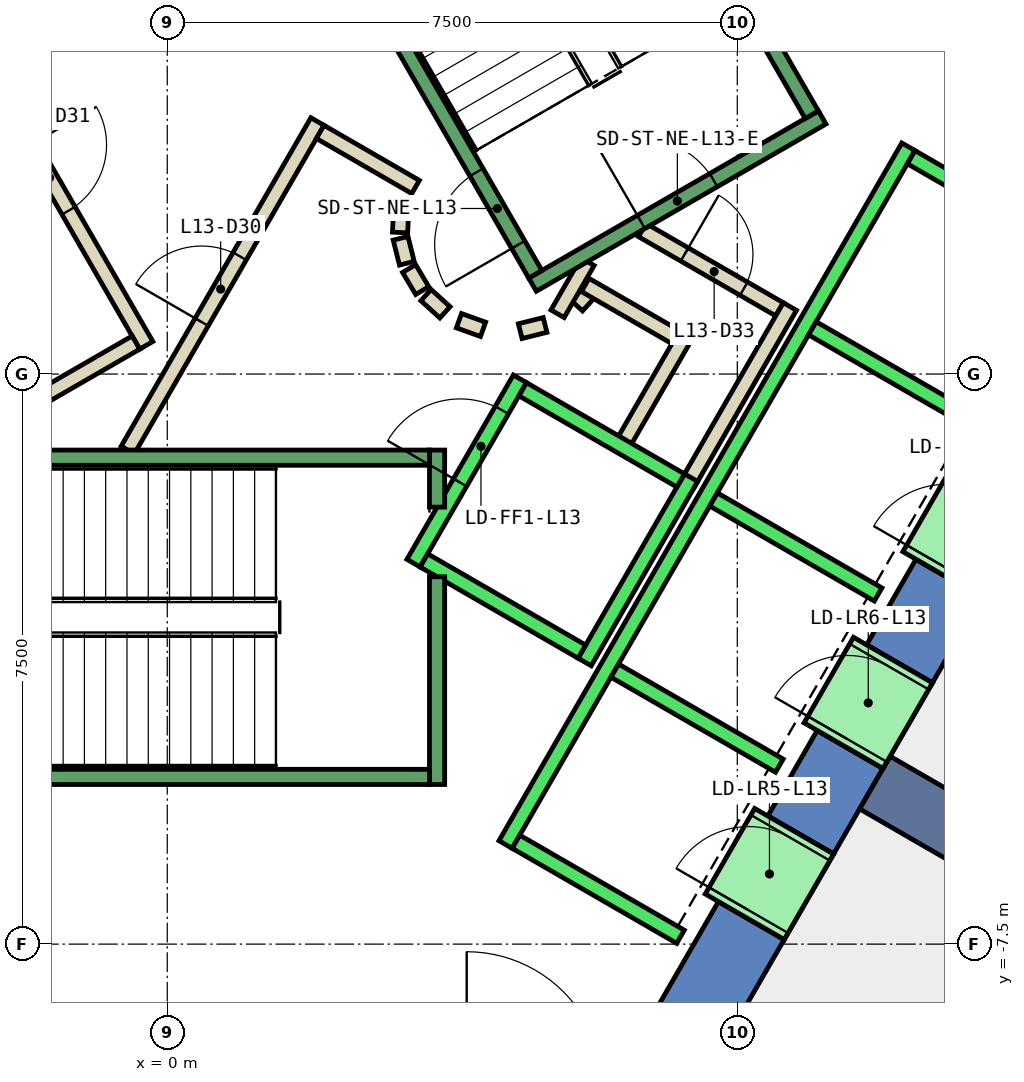
"""IFC4 building model, lengths in metres.
Left out: names, types, materials, properties, quantities, classifications, styles, units other than length and angle.
Written with IfcOpenShell. Run it as: python <this file> out.ifc"""

import sys

from ifc_helpers import new_model, si_unit, direction, frame, frame_2d, origin, place, context, subcontext, project, spatial, polyline, rectangle, outline, extrude, element, fill, save


model = new_model("IFC4")
c1 = context("Model", 3, precision=1e-05, world=origin(), true_north=direction((0.0, 1.0)))
c2 = subcontext(c1, "Body", "Model", "MODEL_VIEW")
j1 = project(units=[si_unit("LENGTHUNIT", "METRE"), si_unit("PLANEANGLEUNIT", "RADIAN")], contexts=[c1])
p1 = place(None, origin())
s1 = spatial("IfcSite", under=j1, at=p1, CompositionType="ELEMENT")
p2 = place(p1, origin())
s2 = spatial("IfcBuilding", under=s1, at=p2, CompositionType="ELEMENT")
p3 = place(p2, frame((0.0, 0.0, 64.4)))
s3 = spatial("IfcBuildingStorey", under=s2, at=p3, CompositionType="ELEMENT", Elevation=64.4)
p4 = place(p3, frame((0.0, 0.0, -0.4)))
e1 = element("IfcWall", 1, at=p4, inside=s3, PredefinedType="SHEAR", context=c2, shape_type="SweptSolid", body=[
    extrude(outline(polyline([(8.517, 11.748), (7.651, 11.248), (12.702, 2.5), (13.856, 2.5), (8.517, 11.748)])), origin(), (0.0, 0.0, 1.0), 4.2),
])
p5 = place(p3, frame((0.0, 0.0, -0.4)))
e2 = element("IfcWall", 2, at=p5, inside=s3, PredefinedType="SHEAR", context=c2, shape_type="SweptSolid", body=[
    extrude(outline(polyline([(8.117, -7.44), (7.252, -6.94), (6.351, -8.5), (6.928, -9.5), (8.117, -7.44)])), origin(), (0.0, 0.0, 1.0), 4.2),
])
p6 = place(p3, frame((0.0, 0.0, -0.4)))
e3 = element("IfcWall", 3, at=p6, inside=s3, PredefinedType="SHEAR", context=c2, shape_type="SweptSolid", body=[
    extrude(outline(polyline([(9.417, -5.189), (8.551, -4.689), (7.902, -5.814), (8.767, -6.314), (9.417, -5.189)])), origin(), (0.0, 0.0, 1.0), 4.2),
])
p7 = place(p3, frame((0.0, 0.0, -0.4)))
e4 = element("IfcWall", 4, at=p7, inside=s3, PredefinedType="SHEAR", context=c2, shape_type="SweptSolid", body=[
    extrude(outline(polyline([(10.717, -2.937), (9.851, -2.437), (9.201, -3.563), (10.067, -4.063), (10.717, -2.937)])), origin(), (0.0, 0.0, 1.0), 4.2),
])
p8 = place(p3, frame((0.0, 0.0, 3.6)))
e5 = element("IfcWall", 5, at=p8, inside=s3, PredefinedType="SHEAR", context=c2, shape_type="SweptSolid", body=[
    extrude(outline(polyline([(8.767, -6.314), (7.902, -5.814), (7.252, -6.94), (8.117, -7.44), (8.767, -6.314)])), origin(), (0.0, 0.0, 1.0), 0.2),
])
p9 = place(p3, frame((0.0, 0.0, 3.6)))
e6 = element("IfcWall", 6, at=p9, inside=s3, PredefinedType="SHEAR", context=c2, shape_type="SweptSolid", body=[
    extrude(outline(polyline([(10.067, -4.063), (9.201, -3.563), (8.551, -4.689), (9.417, -5.189), (10.067, -4.063)])), origin(), (0.0, 0.0, 1.0), 0.2),
])
p10 = place(p3, frame((0.0, 0.0, 3.6)))
e7 = element("IfcWall", 7, at=p10, inside=s3, PredefinedType="SHEAR", context=c2, shape_type="SweptSolid", body=[
    extrude(outline(polyline([(11.367, -1.811), (10.501, -1.311), (9.851, -2.437), (10.717, -2.937), (11.367, -1.811)])), origin(), (0.0, 0.0, 1.0), 0.2),
])
p11 = place(p3, frame((9.31, -5.375, -0.4), z_axis=(0.0, 0.0, 1.0), x_axis=(0.866017533419, -0.500013631625, 0.0)))
e8 = element("IfcWall", 8, at=p11, inside=s3, PredefinedType="SHEAR", context=c2, shape_type="SweptSolid", body=[
    extrude(rectangle(XDim=9.0, YDim=0.8, at=frame_2d((4.5, 0.0))), origin(), (0.0, 0.0, 1.0), 4.2),
])
p12 = place(p3, frame((5.39, 0.898, 0.0), z_axis=(0.0, 0.0, 1.0), x_axis=(0.673828488714, 0.738887791073, 0.0)))
e9 = element("IfcWall", 9, at=p12, inside=s3, PredefinedType="PARTITIONING", context=c2, shape_type="SweptSolid", body=[
    extrude(rectangle(XDim=0.263, YDim=0.2, at=frame_2d((0.131, 0.0))), origin(), (0.0, 0.0, 1.0), 3.8),
])
p13 = place(p3, frame((5.499, 1.172, 0.0), z_axis=(0.0, 0.0, 1.0), x_axis=(0.866333505267, -0.499465972466, 0.0)))
e10 = element("IfcWall", 10, at=p13, inside=s3, PredefinedType="PARTITIONING", context=c2, shape_type="SweptSolid", body=[
    extrude(rectangle(XDim=1.374, YDim=0.2, at=frame_2d((0.687, 0.0))), origin(), (0.0, 0.0, 1.0), 3.8),
])
p14 = place(p3, frame((6.826, 0.522, 0.0), z_axis=(0.0, 0.0, 1.0), x_axis=(-0.500016722714, -0.866015748706, 0.0)))
e11 = element("IfcWall", 11, at=p14, inside=s3, PredefinedType="PARTITIONING", context=c2, shape_type="SweptSolid", body=[
    extrude(rectangle(XDim=1.7, YDim=0.2, at=frame_2d((0.85, 0.0))), origin(), (0.0, 0.0, 1.0), 3.8),
])
p15 = place(p3, frame((6.25, 1.894, 0.0), z_axis=(0.0, 0.0, 1.0), x_axis=(0.866043184279, -0.499969202016, 0.0)))
e12 = element("IfcWall", 12, at=p15, inside=s3, PredefinedType="PARTITIONING", context=c2, shape_type="SweptSolid", body=[
    extrude(rectangle(XDim=2.084, YDim=0.2, at=frame_2d((1.042, 0.0))), origin(), (0.0, 0.0, 1.0), 3.8),
])
p16 = place(p15, frame((0.642, 0.0, 0.0)))
e13 = element("IfcOpeningElement", 13, at=p16, cuts=e12, PredefinedType="OPENING", context=c2, shape_type="SweptSolid", body=[
    extrude(rectangle(XDim=0.9, YDim=2.1, at=frame_2d((0.45, 1.05))), frame((0.0, 0.11, 0.0), z_axis=(0.0, -1.0, 0.0), x_axis=(1.0, 0.0, 0.0)), (0.0, 0.0, 1.0), 0.22),
])
p17 = place(p3, frame((8.192, 0.888, 0.0), z_axis=(0.0, 0.0, 1.0), x_axis=(-0.499940625693, -0.866059680843, 0.0)))
e14 = element("IfcWall", 14, at=p17, inside=s3, PredefinedType="PARTITIONING", context=c2, shape_type="SweptSolid", body=[
    extrude(rectangle(XDim=2.68, YDim=0.2, at=frame_2d((1.34, 0.0))), origin(), (0.0, 0.0, 1.0), 3.8),
])
p18 = place(p3, frame((5.135, 0.793, 0.0), z_axis=(0.0, 0.0, 1.0), x_axis=(0.499526442893, 0.866298639529, 0.0)))
e15 = element("IfcWall", 15, at=p18, inside=s3, PredefinedType="PARTITIONING", context=c2, shape_type="SweptSolid", body=[
    extrude(rectangle(XDim=0.791, YDim=0.2, at=frame_2d((0.396, 0.0))), origin(), (0.0, 0.0, 1.0), 3.8),
])
p19 = place(p3, frame((-0.52, -1.0, 0.0), z_axis=(0.0, 0.0, 1.0), x_axis=(0.50011622646, 0.865958290007, 0.0)))
e16 = element("IfcWall", 16, at=p19, inside=s3, PredefinedType="PARTITIONING", context=c2, shape_type="SweptSolid", body=[
    extrude(rectangle(XDim=4.991, YDim=0.2, at=frame_2d((2.496, 0.0))), origin(), (0.0, 0.0, 1.0), 3.8),
])
p20 = place(p19, frame((1.945, 0.0, 0.0)))
e17 = element("IfcOpeningElement", 17, at=p20, cuts=e16, PredefinedType="OPENING", context=c2, shape_type="SweptSolid", body=[
    extrude(rectangle(XDim=1.0, YDim=2.1, at=frame_2d((0.5, 1.05))), frame((0.0, 0.11, 0.0), z_axis=(0.0, -1.0, 0.0), x_axis=(1.0, 0.0, 0.0)), (0.0, 0.0, 1.0), 0.22),
])
p21 = place(p3, frame((2.012, 3.186, 0.0), z_axis=(0.0, 0.0, 1.0), x_axis=(0.865891012941, -0.500232699559, 0.0)))
e18 = element("IfcWall", 18, at=p21, inside=s3, PredefinedType="PARTITIONING", context=c2, shape_type="SweptSolid", body=[
    extrude(rectangle(XDim=1.449, YDim=0.2, at=frame_2d((0.725, 0.0))), origin(), (0.0, 0.0, 1.0), 3.8),
])
p22 = place(p3, frame((3.079, 2.199, 0.0), z_axis=(0.0, 0.0, 1.0), x_axis=(-0.047771483479, -0.998858290933, 0.0)))
e19 = element("IfcWall", 19, at=p22, inside=s3, PredefinedType="PARTITIONING", context=c2, shape_type="SweptSolid", body=[
    extrude(rectangle(XDim=0.337, YDim=0.2, at=frame_2d((0.169, 0.0))), origin(), (0.0, 0.0, 1.0), 3.8),
])
p23 = place(p3, frame((3.07, 1.786, 0.0), z_axis=(0.0, 0.0, 1.0), x_axis=(0.242705583207, -0.970099994784, 0.0)))
e20 = element("IfcWall", 20, at=p23, inside=s3, PredefinedType="PARTITIONING", context=c2, shape_type="SweptSolid", body=[
    extrude(rectangle(XDim=0.338, YDim=0.2, at=frame_2d((0.169, 0.0))), origin(), (0.0, 0.0, 1.0), 3.8),
])
for number, where, z_axis, x_axis in (
    (21, (3.182, 1.388, 0.0), (0.0, 0.0, 1.0), (0.512, -0.859, 0.0)),
    (22, (3.404, 1.039, 0.0), (0.0, 0.0, 1.0), (0.74, -0.672, 0.0)),
):
    element("IfcWall", number, at=place(p3, frame(where, z_axis=z_axis, x_axis=x_axis)), inside=s3, PredefinedType="PARTITIONING", context=c2, shape_type="SweptSolid", body=[
        extrude(rectangle(XDim=0.338, YDim=0.2, at=frame_2d((0.169, 0.0))), origin(), (0.0, 0.0, 1.0), 3.8),
    ])
p24 = place(p3, frame((3.838, 0.702, 0.0), z_axis=(0.0, 0.0, 1.0), x_axis=(0.941035081519, -0.338308993895, 0.0)))
e23 = element("IfcWall", 23, at=p24, inside=s3, PredefinedType="PARTITIONING", context=c2, shape_type="SweptSolid", body=[
    extrude(rectangle(XDim=0.337, YDim=0.2, at=frame_2d((0.168, 0.0))), origin(), (0.0, 0.0, 1.0), 3.8),
])
p25 = place(p3, frame((4.644, 0.564, 0.0), z_axis=(0.0, 0.0, 1.0), x_axis=(0.969929076366, 0.243387729394, 0.0)))
e24 = element("IfcWall", 24, at=p25, inside=s3, PredefinedType="PARTITIONING", context=c2, shape_type="SweptSolid", body=[
    extrude(rectangle(XDim=0.337, YDim=0.2, at=frame_2d((0.168, 0.0))), origin(), (0.0, 0.0, 1.0), 3.8),
])
p26 = place(p3, frame((-2.771, 4.7, 0.0), z_axis=(0.0, 0.0, 1.0), x_axis=(0.499969479948, -0.866043023828, 0.0)))
e25 = element("IfcWall", 25, at=p26, inside=s3, PredefinedType="PARTITIONING", context=c2, shape_type="SweptSolid", body=[
    extrude(rectangle(XDim=4.99, YDim=0.2, at=frame_2d((2.495, 0.0))), origin(), (0.0, 0.0, 1.0), 3.8),
])
p27 = place(p26, frame((1.945, 0.0, 0.0)))
e26 = element("IfcOpeningElement", 26, at=p27, cuts=e25, PredefinedType="OPENING", context=c2, shape_type="SweptSolid", body=[
    extrude(rectangle(XDim=1.0, YDim=2.1, at=frame_2d((0.5, 1.05))), frame((0.0, 0.11, 0.0), z_axis=(0.0, -1.0, 0.0), x_axis=(1.0, 0.0, 0.0)), (0.0, 0.0, 1.0), 0.22),
])
p28 = place(p3, frame((-0.412, 0.414, 0.0), z_axis=(0.0, 0.0, 1.0), x_axis=(-0.866017369001, -0.500013916395, 0.0)))
e27 = element("IfcWall", 27, at=p28, inside=s3, PredefinedType="PARTITIONING", context=c2, shape_type="SweptSolid", body=[
    extrude(rectangle(XDim=1.45, YDim=0.2, at=frame_2d((0.725, 0.0))), origin(), (0.0, 0.0, 1.0), 3.8),
])
p29 = place(p3, frame((12.401, -7.622, 0.0), z_axis=(0.0, 0.0, 1.0), x_axis=(-0.500029185841, -0.866008552675, 0.0)))
e28 = element("IfcWall", 28, at=p29, inside=s3, PredefinedType="PARTITIONING", context=c2, shape_type="SweptSolid", body=[
    extrude(rectangle(XDim=9.301, YDim=0.2, at=frame_2d((4.651, 0.0))), origin(), (0.0, 0.0, 1.0), 3.8),
])
p30 = place(p3, frame((3.24, -2.488, 0.0), z_axis=(0.0, 0.0, 1.0), x_axis=(0.49994636267, 0.866056369097, 0.0)))
e29 = element("IfcWall", 29, at=p30, inside=s3, PredefinedType="STANDARD", context=c2, shape_type="SweptSolid", body=[
    extrude(rectangle(XDim=2.8, YDim=0.2, at=frame_2d((1.4, 0.0))), origin(), (0.0, 0.0, 1.0), 3.8),
])
p31 = place(p30, frame((1.225, 0.0, 0.0)))
e30 = element("IfcOpeningElement", 30, at=p31, cuts=e29, PredefinedType="OPENING", context=c2, shape_type="SweptSolid", body=[
    extrude(rectangle(XDim=1.1, YDim=2.1, at=frame_2d((0.55, 1.05))), frame((0.0, 0.11, 0.0), z_axis=(0.0, -1.0, 0.0), x_axis=(1.0, 0.0, 0.0)), (0.0, 0.0, 1.0), 0.22),
])
p32 = place(p3, frame((5.492, -3.788, 0.0), z_axis=(0.0, 0.0, 1.0), x_axis=(0.500011755427, 0.866018616679, 0.0)))
e31 = element("IfcWall", 31, at=p32, inside=s3, PredefinedType="STANDARD", context=c2, shape_type="SweptSolid", body=[
    extrude(rectangle(XDim=2.8, YDim=0.2, at=frame_2d((1.4, 0.0))), origin(), (0.0, 0.0, 1.0), 3.8),
])
p33 = place(p3, frame((3.377, -2.452, 0.0), z_axis=(0.0, 0.0, 1.0), x_axis=(0.865955154139, -0.50012165622, 0.0)))
e32 = element("IfcWall", 32, at=p33, inside=s3, PredefinedType="STANDARD", context=c2, shape_type="SweptSolid", body=[
    extrude(rectangle(XDim=2.4, YDim=0.2, at=frame_2d((1.2, 0.0))), origin(), (0.0, 0.0, 1.0), 3.8),
])
p34 = place(p3, frame((4.677, -0.2, 0.0), z_axis=(0.0, 0.0, 1.0), x_axis=(0.865973769406, -0.500089422704, 0.0)))
e33 = element("IfcWall", 33, at=p34, inside=s3, PredefinedType="STANDARD", context=c2, shape_type="SweptSolid", body=[
    extrude(rectangle(XDim=2.399, YDim=0.2, at=frame_2d((1.2, 0.0))), origin(), (0.0, 0.0, 1.0), 3.8),
])
p35 = place(p3, frame((4.451, -6.19, 0.0), z_axis=(0.0, 0.0, 1.0), x_axis=(0.50000090737, 0.866024879913, 0.0)))
e34 = element("IfcWall", 34, at=p35, inside=s3, PredefinedType="STANDARD", context=c2, shape_type="SweptSolid", body=[
    extrude(rectangle(XDim=10.6, YDim=0.2, at=frame_2d((5.3, 0.0))), origin(), (0.0, 0.0, 1.0), 3.8),
])
for number, where, z_axis, x_axis in (
    (35, (4.588, -6.153, 0.0), (0.0, 0.0, 1.0), (0.866, -0.5, 0.0)),
    (36, (5.888, -3.902, 0.0), (0.0, 0.0, 1.0), (0.866, -0.5, 0.0)),
    (37, (7.188, -1.65, 0.0), (0.0, 0.0, 1.0), (0.866, -0.5, 0.0)),
    (38, (8.488, 0.602, 0.0), (0.0, 0.0, 1.0), (0.866, -0.5, 0.0)),
):
    element("IfcWall", number, at=place(p3, frame(where, z_axis=z_axis, x_axis=x_axis)), inside=s3, PredefinedType="STANDARD", context=c2, shape_type="SweptSolid", body=[
        extrude(rectangle(XDim=2.5, YDim=0.2, at=frame_2d((1.25, 0.0))), origin(), (0.0, 0.0, 1.0), 3.8),
    ])
p36 = place(p3, frame((9.788, 2.853, 0.0), z_axis=(0.0, 0.0, 1.0), x_axis=(0.865998541277, -0.500046524342, 0.0)))
e39 = element("IfcWall", 39, at=p36, inside=s3, PredefinedType="STANDARD", context=c2, shape_type="SweptSolid", body=[
    extrude(rectangle(XDim=2.5, YDim=0.2, at=frame_2d((1.25, 0.0))), origin(), (0.0, 0.0, 1.0), 3.8),
])
p37 = place(p3, frame((7.598, -7.14, 0.0), z_axis=(0.0, 0.0, 1.0), x_axis=(0.500362116554, 0.865816234728, 0.0)))
e40 = element("IfcWall", 40, at=p37, inside=s3, PredefinedType="STANDARD", context=c2, shape_type="SweptSolid", body=[
    extrude(rectangle(XDim=1.299, YDim=1.2, at=frame_2d((0.65, 0.0))), origin(), (0.0, 0.0, 1.0), 2.4),
])
p38 = place(p37, frame((0.1, 0.0, 0.0)))
e41 = element("IfcOpeningElement", 41, at=p38, cuts=e40, PredefinedType="OPENING", context=c2, shape_type="SweptSolid", body=[
    extrude(rectangle(XDim=1.1, YDim=2.3, at=frame_2d((0.55, 1.15))), frame((0.0, 0.61, 0.0), z_axis=(0.0, -1.0, 0.0), x_axis=(1.0, 0.0, 0.0)), (0.0, 0.0, 1.0), 1.22),
])
p39 = place(p3, frame((8.898, -4.889, 0.0), z_axis=(0.0, 0.0, 1.0), x_axis=(0.500036693733, 0.866004217611, 0.0)))
e42 = element("IfcWall", 42, at=p39, inside=s3, PredefinedType="STANDARD", context=c2, shape_type="SweptSolid", body=[
    extrude(rectangle(XDim=1.3, YDim=1.2, at=frame_2d((0.65, 0.0))), origin(), (0.0, 0.0, 1.0), 2.4),
])
p40 = place(p39, frame((0.1, 0.0, 0.0)))
e43 = element("IfcOpeningElement", 43, at=p40, cuts=e42, PredefinedType="OPENING", context=c2, shape_type="SweptSolid", body=[
    extrude(rectangle(XDim=1.1, YDim=2.3, at=frame_2d((0.55, 1.15))), frame((0.0, 0.61, 0.0), z_axis=(0.0, -1.0, 0.0), x_axis=(1.0, 0.0, 0.0)), (0.0, 0.0, 1.0), 1.22),
])
p41 = place(p3, frame((10.198, -2.637, 0.0), z_axis=(0.0, 0.0, 1.0), x_axis=(0.49989585183, 0.866085525409, 0.0)))
e44 = element("IfcWall", 44, at=p41, inside=s3, PredefinedType="STANDARD", context=c2, shape_type="SweptSolid", body=[
    extrude(rectangle(XDim=1.3, YDim=1.2, at=frame_2d((0.65, 0.0))), origin(), (0.0, 0.0, 1.0), 2.4),
])
p42 = place(p41, frame((0.1, 0.0, 0.0)))
e45 = element("IfcOpeningElement", 45, at=p42, cuts=e44, PredefinedType="OPENING", context=c2, shape_type="SweptSolid", body=[
    extrude(rectangle(XDim=1.1, YDim=2.3, at=frame_2d((0.55, 1.15))), frame((0.0, 0.61, 0.0), z_axis=(0.0, -1.0, 0.0), x_axis=(1.0, 0.0, 0.0)), (0.0, 0.0, 1.0), 1.22),
])
p43 = place(p3, frame((3.55, -2.667, 0.0), z_axis=(0.0, 0.0, 1.0), x_axis=(0.0, -1.0, 0.0)))
e46 = element("IfcWall", 46, at=p43, inside=s3, PredefinedType="STANDARD", context=c2, shape_type="SweptSolid", body=[
    extrude(rectangle(XDim=2.733, YDim=0.2, at=frame_2d((1.366, 0.0))), origin(), (0.0, 0.0, 1.0), 3.8),
])
p44 = place(p3, frame((3.55, -1.0, 0.0), z_axis=(0.0, 0.0, 1.0), x_axis=(0.0, -1.0, 0.0)))
e47 = element("IfcWall", 47, at=p44, inside=s3, PredefinedType="STANDARD", context=c2, shape_type="SweptSolid", body=[
    extrude(rectangle(XDim=0.751, YDim=0.2, at=frame_2d((0.375, 0.0))), origin(), (0.0, 0.0, 1.0), 3.8),
])
p45 = place(p3, frame((-3.45, -1.1, 0.0), z_axis=(0.0, 0.0, 1.0), x_axis=(1.0, 0.0, 0.0)))
e48 = element("IfcWall", 48, at=p45, inside=s3, PredefinedType="STANDARD", context=c2, shape_type="SweptSolid", body=[
    extrude(rectangle(XDim=6.9, YDim=0.2, at=frame_2d((3.45, 0.0))), origin(), (0.0, 0.0, 1.0), 3.8),
])
p46 = place(p45, frame((0.45, 0.0, 0.0)))
e49 = element("IfcOpeningElement", 49, at=p46, cuts=e48, PredefinedType="OPENING", context=c2, shape_type="SweptSolid", body=[
    extrude(rectangle(XDim=1.1, YDim=2.2, at=frame_2d((0.55, 1.1))), frame((0.0, 0.11, 0.0), z_axis=(0.0, -1.0, 0.0), x_axis=(1.0, 0.0, 0.0)), (0.0, 0.0, 1.0), 0.22),
])
p47 = place(p3, frame((-3.45, -5.3, 0.0), z_axis=(0.0, 0.0, 1.0), x_axis=(1.0, 0.0, 0.0)))
e50 = element("IfcWall", 50, at=p47, inside=s3, PredefinedType="STANDARD", context=c2, shape_type="SweptSolid", body=[
    extrude(rectangle(XDim=6.9, YDim=0.2, at=frame_2d((3.45, 0.0))), origin(), (0.0, 0.0, 1.0), 3.8),
])
p48 = place(p3, frame((4.806, 1.176, 0.0), z_axis=(0.0, 0.0, 1.0), x_axis=(0.866059941101, 0.499940174841, 0.0)))
e51 = element("IfcWall", 51, at=p48, inside=s3, PredefinedType="STANDARD", context=c2, shape_type="SweptSolid", body=[
    extrude(rectangle(XDim=4.4, YDim=0.2, at=frame_2d((2.2, 0.0))), origin(), (0.0, 0.0, 1.0), 3.8),
])
p49 = place(p48, frame((1.65, 0.0, 0.0)))
e52 = element("IfcOpeningElement", 52, at=p49, cuts=e51, PredefinedType="OPENING", context=c2, shape_type="SweptSolid", body=[
    extrude(rectangle(XDim=1.1, YDim=2.2, at=frame_2d((0.55, 1.1))), frame((0.0, 0.11, 0.0), z_axis=(0.0, -1.0, 0.0), x_axis=(1.0, 0.0, 0.0)), (0.0, 0.0, 1.0), 0.22),
])
p50 = place(p3, frame((4.843, 1.312, 0.0), z_axis=(0.0, 0.0, 1.0), x_axis=(-0.499963383562, 0.866046543262, 0.0)))
e53 = element("IfcWall", 53, at=p50, inside=s3, PredefinedType="STANDARD", context=c2, shape_type="SweptSolid", body=[
    extrude(rectangle(XDim=6.9, YDim=0.2, at=frame_2d((3.45, 0.0))), origin(), (0.0, 0.0, 1.0), 3.8),
])
p51 = place(p50, frame((0.45, 0.0, 0.0)))
e54 = element("IfcOpeningElement", 54, at=p51, cuts=e53, PredefinedType="OPENING", context=c2, shape_type="SweptSolid", body=[
    extrude(rectangle(XDim=1.1, YDim=2.2, at=frame_2d((0.55, 1.1))), frame((0.0, 0.11, 0.0), z_axis=(0.0, -1.0, 0.0), x_axis=(1.0, 0.0, 0.0)), (0.0, 0.0, 1.0), 0.22),
])
p52 = place(p3, frame((8.48, 3.412, 0.0), z_axis=(0.0, 0.0, 1.0), x_axis=(-0.499978703459, 0.866037698999, 0.0)))
e55 = element("IfcWall", 55, at=p52, inside=s3, PredefinedType="STANDARD", context=c2, shape_type="SweptSolid", body=[
    extrude(rectangle(XDim=6.9, YDim=0.2, at=frame_2d((3.45, 0.0))), origin(), (0.0, 0.0, 1.0), 3.8),
])
p53 = place(p3, frame((-1.393, 7.288, 0.0), z_axis=(0.0, 0.0, 1.0), x_axis=(-0.499963383562, -0.866046543262, 0.0)))
e56 = element("IfcWall", 56, at=p53, inside=s3, PredefinedType="STANDARD", context=c2, shape_type="SweptSolid", body=[
    extrude(rectangle(XDim=6.9, YDim=0.2, at=frame_2d((3.45, 0.0))), origin(), (0.0, 0.0, 1.0), 3.8),
])
p54 = place(p53, frame((0.45, 0.0, 0.0)))
e57 = element("IfcOpeningElement", 57, at=p54, cuts=e56, PredefinedType="OPENING", context=c2, shape_type="SweptSolid", body=[
    extrude(rectangle(XDim=1.1, YDim=2.2, at=frame_2d((0.55, 1.1))), frame((0.0, 0.11, 0.0), z_axis=(0.0, -1.0, 0.0), x_axis=(1.0, 0.0, 0.0)), (0.0, 0.0, 1.0), 0.22),
])
p55 = place(p20, origin())
e58 = element("IfcDoor", 58, at=p55, inside=s3, OperationType="SINGLE_SWING_LEFT", PredefinedType="DOOR", context=c2, shape_type="SweptSolid", body=[
    extrude(rectangle(XDim=1.0, YDim=2.1, at=frame_2d((0.5, 1.05))), frame((0.0, 0.025, 0.0), z_axis=(0.0, -1.0, 0.0), x_axis=(1.0, 0.0, 0.0)), (0.0, 0.0, 1.0), 0.05),
])
fill(e17, e58)
p56 = place(p27, origin())
e59 = element("IfcDoor", 59, at=p56, inside=s3, OperationType="SINGLE_SWING_RIGHT", PredefinedType="DOOR", context=c2, shape_type="SweptSolid", body=[
    extrude(rectangle(XDim=1.0, YDim=2.1, at=frame_2d((0.5, 1.05))), frame((0.0, 0.025, 0.0), z_axis=(0.0, -1.0, 0.0), x_axis=(1.0, 0.0, 0.0)), (0.0, 0.0, 1.0), 0.05),
])
fill(e26, e59)
p57 = place(p16, origin())
e60 = element("IfcDoor", 60, at=p57, inside=s3, OperationType="SINGLE_SWING_LEFT", PredefinedType="DOOR", context=c2, shape_type="SweptSolid", body=[
    extrude(rectangle(XDim=0.9, YDim=2.1, at=frame_2d((0.45, 1.05))), frame((0.0, 0.025, 0.0), z_axis=(0.0, -1.0, 0.0), x_axis=(1.0, 0.0, 0.0)), (0.0, 0.0, 1.0), 0.05),
])
fill(e13, e60)
p58 = place(p38, origin())
e61 = element("IfcDoor", 61, at=p58, inside=s3, OperationType="SLIDING_TO_LEFT", PredefinedType="DOOR", context=c2, shape_type="SweptSolid", body=[
    extrude(rectangle(XDim=1.1, YDim=2.3, at=frame_2d((0.55, 1.15))), frame((0.0, 0.025, 0.0), z_axis=(0.0, -1.0, 0.0), x_axis=(1.0, 0.0, 0.0)), (0.0, 0.0, 1.0), 0.05),
])
fill(e41, e61)
p59 = place(p40, origin())
e62 = element("IfcDoor", 62, at=p59, inside=s3, OperationType="SLIDING_TO_LEFT", PredefinedType="DOOR", context=c2, shape_type="SweptSolid", body=[
    extrude(rectangle(XDim=1.1, YDim=2.3, at=frame_2d((0.55, 1.15))), frame((0.0, 0.025, 0.0), z_axis=(0.0, -1.0, 0.0), x_axis=(1.0, 0.0, 0.0)), (0.0, 0.0, 1.0), 0.05),
])
fill(e43, e62)
p60 = place(p31, origin())
e63 = element("IfcDoor", 63, at=p60, inside=s3, OperationType="SLIDING_TO_LEFT", PredefinedType="DOOR", context=c2, shape_type="SweptSolid", body=[
    extrude(rectangle(XDim=1.1, YDim=2.1, at=frame_2d((0.55, 1.05))), frame((0.0, 0.025, 0.0), z_axis=(0.0, -1.0, 0.0), x_axis=(1.0, 0.0, 0.0)), (0.0, 0.0, 1.0), 0.05),
])
fill(e30, e63)
p61 = place(p51, origin())
e64 = element("IfcDoor", 64, at=p61, inside=s3, OperationType="SINGLE_SWING_LEFT", PredefinedType="DOOR", context=c2, shape_type="SweptSolid", body=[
    extrude(rectangle(XDim=1.1, YDim=2.2, at=frame_2d((0.55, 1.1))), frame((0.0, 0.025, 0.0), z_axis=(0.0, -1.0, 0.0), x_axis=(1.0, 0.0, 0.0)), (0.0, 0.0, 1.0), 0.05),
])
fill(e54, e64)
p62 = place(p49, origin())
e65 = element("IfcDoor", 65, at=p62, inside=s3, OperationType="SINGLE_SWING_LEFT", PredefinedType="DOOR", context=c2, shape_type="SweptSolid", body=[
    extrude(rectangle(XDim=1.1, YDim=2.2, at=frame_2d((0.55, 1.1))), frame((0.0, 0.025, 0.0), z_axis=(0.0, -1.0, 0.0), x_axis=(1.0, 0.0, 0.0)), (0.0, 0.0, 1.0), 0.05),
])
fill(e52, e65)
save(model, sys.argv[1])
